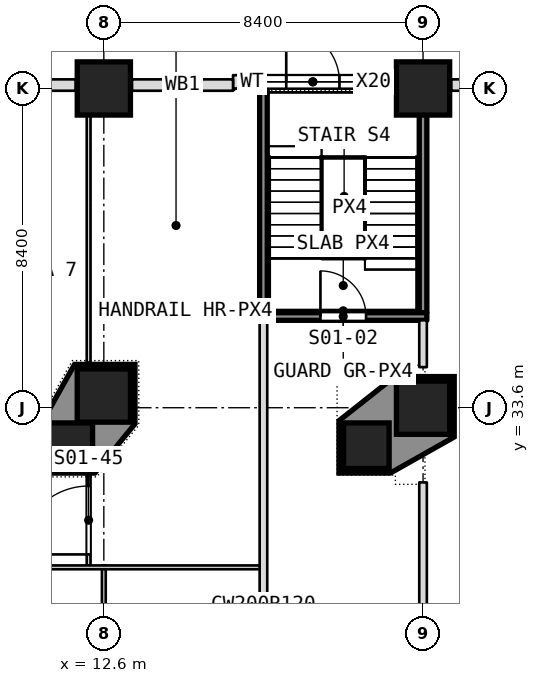
"""IFC4 building model, lengths in metres.
Left out: names, types, materials, properties, quantities, classifications, styles, units other than length and angle.
Written with IfcOpenShell. Run it as: python <this file> out.ifc"""

import sys

from ifc_helpers import new_model, si_unit, direction, frame, frame_2d, origin, origin_2d, place, context, subcontext, project, spatial, polyline, rectangle, outline, extrude, element, fill, save


model = new_model("IFC4")
c1 = context("Model", 3, precision=1e-05, world=origin(), true_north=direction((0.0, 1.0)))
c2 = subcontext(c1, "Body", "Model", "MODEL_VIEW")
j1 = project(units=[si_unit("LENGTHUNIT", "METRE"), si_unit("PLANEANGLEUNIT", "RADIAN")], contexts=[c1])
p1 = place(None, origin())
s1 = spatial("IfcSite", under=j1, at=p1, CompositionType="ELEMENT")
p2 = place(p1, origin())
s2 = spatial("IfcBuilding", under=s1, at=p2, CompositionType="ELEMENT")
p3 = place(p2, origin())
s3 = spatial("IfcBuildingStorey", under=s2, at=p3, CompositionType="ELEMENT", Elevation=0.0)
for number, where, z_axis, x_axis in (
    (1, (12.6, 33.92, -0.3), (0.0, 0.0, 1.0), (1.0, 0.0, 0.0)),
    (2, (21.0, 33.6, -0.3), (0.0, 0.0, 1.0), (1.0, 0.0, 0.0)),
    (3, (12.6, 42.0, -0.3), (0.0, 0.0, 1.0), (1.0, 0.0, 0.0)),
    (4, (21.0, 42.0, -0.3), (0.0, 0.0, 1.0), (1.0, 0.0, 0.0)),
):
    element("IfcColumn", number, at=place(p3, frame(where, z_axis=z_axis, x_axis=x_axis)), inside=s3, PredefinedType="COLUMN", context=c2, shape_type="SweptSolid", body=[
        extrude(rectangle(XDim=1.4, YDim=1.4, at=origin_2d()), origin(), (0.0, 0.0, 1.0), 8.3),
    ])
for number, where, z_axis, x_axis in (
    (5, (11.704, 32.6, -0.3), (0.0, 0.0, 1.0), (1.0, 0.0, 0.0)),
    (6, (19.507, 32.6, -0.3), (0.0, 0.0, 1.0), (1.0, 0.0, 0.0)),
):
    element("IfcColumn", number, at=place(p3, frame(where, z_axis=z_axis, x_axis=x_axis)), inside=s3, PredefinedType="COLUMN", context=c2, shape_type="SweptSolid", body=[
        extrude(rectangle(XDim=1.2, YDim=1.2, at=origin_2d()), origin(), (0.0, 0.0, 1.0), 8.3),
    ])
p4 = place(p3, frame((21.0, 9.5, 0.0), z_axis=(0.0, 0.0, 1.0), x_axis=(0.0, 1.0, 0.0)))
e7 = element("IfcWall", 7, at=p4, inside=s3, PredefinedType="PARTITIONING", context=c2, shape_type="SweptSolid", body=[
    extrude(rectangle(XDim=22.135, YDim=0.2, at=frame_2d((11.067, 0.0))), origin(), (0.0, 0.0, 1.0), 7.68),
])
p5 = place(p4, frame((3.2, 0.0, 0.0)))
e8 = element("IfcOpeningElement", 8, at=p5, cuts=e7, PredefinedType="OPENING", context=c2, shape_type="SweptSolid", body=[
    extrude(rectangle(XDim=1.0, YDim=2.1, at=frame_2d((0.5, 1.05))), frame((0.0, 0.1, 0.0), z_axis=(0.0, -1.0, 0.0), x_axis=(1.0, 0.0, 0.0)), (0.0, 0.0, 1.0), 0.2),
])
p6 = place(p4, frame((9.467, 0.0, 0.0)))
e9 = element("IfcOpeningElement", 9, at=p6, cuts=e7, PredefinedType="OPENING", context=c2, shape_type="SweptSolid", body=[
    extrude(rectangle(XDim=1.8, YDim=2.1, at=frame_2d((0.9, 1.05))), frame((0.0, 0.1, 0.0), z_axis=(0.0, -1.0, 0.0), x_axis=(1.0, 0.0, 0.0)), (0.0, 0.0, 1.0), 0.2),
])
p7 = place(p3, frame((21.0, 34.668, 0.0), z_axis=(0.0, 0.0, 1.0), x_axis=(0.0, 1.0, 0.0)))
e10 = element("IfcWall", 10, at=p7, inside=s3, PredefinedType="PARTITIONING", context=c2, shape_type="SweptSolid", body=[
    extrude(rectangle(XDim=1.232, YDim=0.2, at=frame_2d((0.616, 0.0))), origin(), (0.0, 0.0, 1.0), 7.68),
])
p8 = place(p3, frame((21.0, 36.1, 0.0), z_axis=(0.0, 0.0, 1.0), x_axis=(0.0, 1.0, 0.0)))
e11 = element("IfcWall", 11, at=p8, inside=s3, PredefinedType="PARTITIONING", context=c2, shape_type="SweptSolid", body=[
    extrude(rectangle(XDim=6.2, YDim=0.2, at=frame_2d((3.1, 0.0))), origin(), (0.0, 0.0, 1.0), 7.68),
])
p9 = place(p3, frame((16.8, 20.9, 0.0), z_axis=(0.0, 0.0, 1.0), x_axis=(0.0, 1.0, 0.0)))
e12 = element("IfcWall", 12, at=p9, inside=s3, PredefinedType="PARTITIONING", context=c2, shape_type="SweptSolid", body=[
    extrude(rectangle(XDim=15.0, YDim=0.2, at=frame_2d((7.5, 0.0))), origin(), (0.0, 0.0, 1.0), 7.68),
])
p10 = place(p3, frame((16.8, 36.1, 0.0), z_axis=(0.0, 0.0, 1.0), x_axis=(0.0, 1.0, 0.0)))
e13 = element("IfcWall", 13, at=p10, inside=s3, PredefinedType="PARTITIONING", context=c2, shape_type="SweptSolid", body=[
    extrude(rectangle(XDim=5.9, YDim=0.2, at=frame_2d((2.95, 0.0))), origin(), (0.0, 0.0, 1.0), 7.68),
])
p11 = place(p3, frame((12.6, 25.92, 0.0), z_axis=(0.0, 0.0, 1.0), x_axis=(0.0, 1.0, 0.0)))
e14 = element("IfcWall", 14, at=p11, inside=s3, PredefinedType="PARTITIONING", context=c2, shape_type="SweptSolid", body=[
    extrude(rectangle(XDim=3.53, YDim=0.1, at=frame_2d((1.765, 0.0))), origin(), (0.0, 0.0, 1.0), 7.68),
])
p12 = place(p3, frame((12.2, 29.45, 0.0), z_axis=(0.0, 0.0, 1.0), x_axis=(0.0, 1.0, 0.0)))
e15 = element("IfcWall", 15, at=p12, inside=s3, PredefinedType="PARTITIONING", context=c2, shape_type="SweptSolid", body=[
    extrude(rectangle(XDim=2.38, YDim=0.1, at=frame_2d((1.19, 0.0))), origin(), (0.0, 0.0, 1.0), 7.68),
])
p13 = place(p12, frame((0.29, 0.0, 0.0)))
e16 = element("IfcOpeningElement", 16, at=p13, cuts=e15, PredefinedType="OPENING", context=c2, shape_type="SweptSolid", body=[
    extrude(rectangle(XDim=1.8, YDim=2.1, at=frame_2d((0.9, 1.05))), frame((0.0, 0.05, 0.0), z_axis=(0.0, -1.0, 0.0), x_axis=(1.0, 0.0, 0.0)), (0.0, 0.0, 1.0), 0.1),
])
p14 = place(p3, frame((12.2, 34.79, 0.0), z_axis=(0.0, 0.0, 1.0), x_axis=(0.0, 1.0, 0.0)))
e17 = element("IfcWall", 17, at=p14, inside=s3, PredefinedType="PARTITIONING", context=c2, shape_type="SweptSolid", body=[
    extrude(rectangle(XDim=7.51, YDim=0.1, at=frame_2d((3.755, 0.0))), origin(), (0.0, 0.0, 1.0), 7.68),
])
p15 = place(p3, frame((4.1, 29.4, 0.0), z_axis=(0.0, 0.0, 1.0), x_axis=(1.0, 0.0, 0.0)))
e18 = element("IfcWall", 18, at=p15, inside=s3, PredefinedType="PARTITIONING", context=c2, shape_type="SweptSolid", body=[
    extrude(rectangle(XDim=12.6, YDim=0.1, at=frame_2d((6.3, 0.0))), origin(), (0.0, 0.0, 1.0), 7.68),
])
p16 = place(p15, frame((3.575, 0.0, 0.0)))
e19 = element("IfcOpeningElement", 19, at=p16, cuts=e18, PredefinedType="OPENING", context=c2, shape_type="SweptSolid", body=[
    extrude(rectangle(XDim=1.0, YDim=2.1, at=frame_2d((0.5, 1.05))), frame((0.0, 0.05, 0.0), z_axis=(0.0, -1.0, 0.0), x_axis=(1.0, 0.0, 0.0)), (0.0, 0.0, 1.0), 0.1),
])
p17 = place(p3, frame((16.7, 36.0, 0.0), z_axis=(0.0, 0.0, 1.0), x_axis=(1.0, 0.0, 0.0)))
e20 = element("IfcWall", 20, at=p17, inside=s3, PredefinedType="PARTITIONING", context=c2, shape_type="SweptSolid", body=[
    extrude(rectangle(XDim=4.4, YDim=0.2, at=frame_2d((2.2, 0.0))), origin(), (0.0, 0.0, 1.0), 7.68),
])
p18 = place(p17, frame((1.6, 0.0, 0.0)))
e21 = element("IfcOpeningElement", 21, at=p18, cuts=e20, PredefinedType="OPENING", context=c2, shape_type="SweptSolid", body=[
    extrude(rectangle(XDim=1.2, YDim=2.1, at=frame_2d((0.6, 1.05))), frame((0.0, 0.1, 0.0), z_axis=(0.0, -1.0, 0.0), x_axis=(1.0, 0.0, 0.0)), (0.0, 0.0, 1.0), 0.2),
])
p19 = place(p3, frame((20.2, 42.175, 0.0), z_axis=(0.0, 0.0, 1.0), x_axis=(-1.0, 0.0, 0.0)))
e22 = element("IfcWall", 22, at=p19, inside=s3, PredefinedType="NOTDEFINED", context=c2, shape_type="SweptSolid", body=[
    extrude(rectangle(XDim=4.2, YDim=0.35, at=frame_2d((2.1, 0.0))), origin(), (0.0, 0.0, 1.0), 6.78),
])
p20 = place(p19, frame((1.4, 0.0, 0.0)))
e23 = element("IfcOpeningElement", 23, at=p20, cuts=e22, PredefinedType="OPENING", context=c2, shape_type="SweptSolid", body=[
    extrude(rectangle(XDim=1.4, YDim=2.2, at=frame_2d((0.7, 1.1))), frame((0.0, 0.175, 0.0), z_axis=(0.0, -1.0, 0.0), x_axis=(1.0, 0.0, 0.0)), (0.0, 0.0, 1.0), 0.35),
])
p21 = place(p19, frame((0.6, 0.0, 2.9)))
e24 = element("IfcOpeningElement", 24, at=p21, cuts=e22, PredefinedType="OPENING", context=c2, shape_type="SweptSolid", body=[
    extrude(rectangle(XDim=3.0, YDim=2.6, at=frame_2d((1.5, 1.3))), frame((0.0, 0.175, 0.0), z_axis=(0.0, -1.0, 0.0), x_axis=(1.0, 0.0, 0.0)), (0.0, 0.0, 1.0), 0.35),
])
p22 = place(p3, frame((28.66, 42.09, 0.0), z_axis=(0.0, 0.0, 1.0), x_axis=(-1.0, 0.0, 0.0)))
e25 = element("IfcWall", 25, at=p22, inside=s3, PredefinedType="NOTDEFINED", context=c2, shape_type="SweptSolid", body=[
    extrude(rectangle(XDim=6.92, YDim=0.3, at=frame_2d((3.46, 0.0))), origin(), (0.0, 0.0, 1.0), 6.78),
])
p23 = place(p3, frame((16.0, 42.09, 0.0), z_axis=(0.0, 0.0, 1.0), x_axis=(-1.0, 0.0, 0.0)))
e26 = element("IfcWall", 26, at=p23, inside=s3, PredefinedType="NOTDEFINED", context=c2, shape_type="SweptSolid", body=[
    extrude(rectangle(XDim=2.66, YDim=0.3, at=frame_2d((1.33, 0.0))), origin(), (0.0, 0.0, 1.0), 6.78),
])
p24 = place(p3, frame((11.86, 42.09, 0.0), z_axis=(0.0, 0.0, 1.0), x_axis=(-1.0, 0.0, 0.0)))
e27 = element("IfcWall", 27, at=p24, inside=s3, PredefinedType="NOTDEFINED", context=c2, shape_type="SweptSolid", body=[
    extrude(rectangle(XDim=1.36, YDim=0.3, at=frame_2d((0.68, 0.0))), origin(), (0.0, 0.0, 1.0), 6.78),
])
p25 = place(p3, origin())
e28 = element("IfcWall", 28, at=p25, inside=s3, PredefinedType="SOLIDWALL", context=c2, shape_type="SweptSolid", body=[
    extrude(outline(polyline([(11.83, 34.74), (13.42, 34.74), (13.42, 33.177), (12.361, 31.88), (10.984, 31.88), (10.984, 33.231), (11.83, 34.74)]), holes=[polyline([(13.3, 33.22), (13.3, 34.62), (11.9, 34.62), (11.9, 33.22), (13.3, 33.22)]), polyline([(12.304, 32.0), (12.304, 33.2), (11.104, 33.2), (11.104, 32.0), (12.304, 32.0)])]), origin(), (0.0, 0.0, 1.0), 8.0),
])
p26 = place(p3, origin())
e29 = element("IfcWall", 29, at=p26, inside=s3, PredefinedType="SOLIDWALL", context=c2, shape_type="SweptSolid", body=[
    extrude(outline(polyline([(20.258, 34.42), (21.82, 34.42), (21.82, 32.83), (20.138, 31.88), (18.787, 31.88), (18.787, 33.258), (20.258, 34.42)]), holes=[polyline([(21.7, 32.9), (21.7, 34.3), (20.3, 34.3), (20.3, 32.9), (21.7, 32.9)]), polyline([(20.107, 32.0), (20.107, 33.2), (18.907, 33.2), (18.907, 32.0), (20.107, 32.0)])]), origin(), (0.0, 0.0, 1.0), 8.0),
])
p27 = place(p13, origin())
e30 = element("IfcDoor", 30, at=p27, inside=s3, OperationType="DOUBLE_DOOR_SINGLE_SWING", PredefinedType="DOOR", context=c2, shape_type="SweptSolid", body=[
    extrude(rectangle(XDim=1.8, YDim=2.1, at=frame_2d((0.9, 1.05))), frame((0.0, 0.025, 0.0), z_axis=(0.0, -1.0, 0.0), x_axis=(1.0, 0.0, 0.0)), (0.0, 0.0, 1.0), 0.05),
])
fill(e16, e30)
p28 = place(p18, origin())
e31 = element("IfcDoor", 31, at=p28, inside=s3, OperationType="SINGLE_SWING_LEFT", PredefinedType="DOOR", context=c2, shape_type="SweptSolid", body=[
    extrude(rectangle(XDim=1.2, YDim=2.1, at=frame_2d((0.6, 1.05))), frame((0.0, 0.025, 0.0), z_axis=(0.0, -1.0, 0.0), x_axis=(1.0, 0.0, 0.0)), (0.0, 0.0, 1.0), 0.05),
])
fill(e21, e31)
p29 = place(p20, frame((1.4, 0.0, 0.0), z_axis=(0.0, 0.0, 1.0), x_axis=(-1.0, 0.0, 0.0)))
e32 = element("IfcDoor", 32, at=p29, inside=s3, OperationType="SINGLE_SWING_RIGHT", PredefinedType="DOOR", context=c2, shape_type="SweptSolid", body=[
    extrude(rectangle(XDim=1.4, YDim=2.2, at=frame_2d((0.7, 1.1))), frame((0.0, 0.025, 0.0), z_axis=(0.0, -1.0, 0.0), x_axis=(1.0, 0.0, 0.0)), (0.0, 0.0, 1.0), 0.05),
])
fill(e23, e32)
p30 = place(p21, origin())
e33 = element("IfcWindow", 33, at=p30, inside=s3, PartitioningType="SINGLE_PANEL", PredefinedType="WINDOW", context=c2, shape_type="SweptSolid", body=[
    extrude(rectangle(XDim=3.0, YDim=2.6, at=frame_2d((1.5, 1.3))), frame((0.0, 0.03, 0.0), z_axis=(0.0, -1.0, 0.0), x_axis=(1.0, 0.0, 0.0)), (0.0, 0.0, 1.0), 0.06),
])
fill(e24, e33)
save(model, sys.argv[1])
